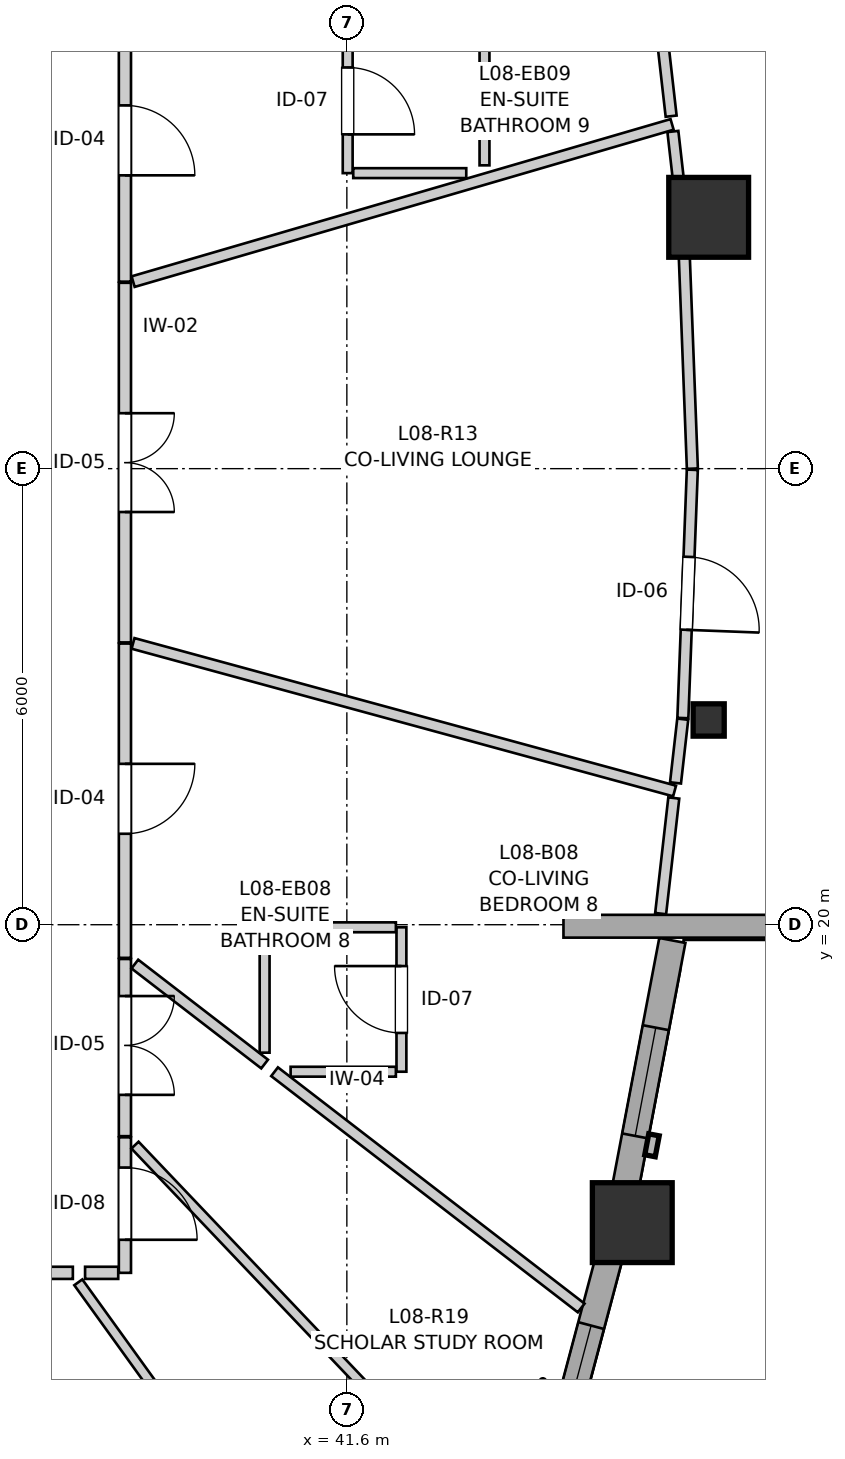
"""IFC4 building model, lengths in metres.
Left out: names, types, materials, properties, quantities, classifications, styles, units other than length and angle.
Written with IfcOpenShell. Run it as: python <this file> out.ifc"""

import sys

from ifc_helpers import new_model, si_unit, direction, frame, frame_2d, origin, origin_2d, place, context, subcontext, project, spatial, rectangle, i_section, extrude, source, transform, mapped, element, fill, save


model = new_model("IFC4")
c1 = context("Model", 3, precision=1e-05, world=origin(), true_north=direction((0.0, 1.0)))
c2 = subcontext(c1, "Body", "Model", "MODEL_VIEW")
j1 = project(units=[si_unit("LENGTHUNIT", "METRE"), si_unit("PLANEANGLEUNIT", "RADIAN")], contexts=[c1])
p1 = place(None, origin())
s1 = spatial("IfcSite", under=j1, at=p1, CompositionType="ELEMENT")
p2 = place(p1, origin())
s2 = spatial("IfcBuilding", under=s1, at=p2, CompositionType="ELEMENT")
p3 = place(p2, frame((0.0, 0.0, 30.2)))
s3 = spatial("IfcBuildingStorey", under=s2, at=p3, CompositionType="ELEMENT", Elevation=30.2)
m1 = source(origin(), c2, "Body", "SweptSolid", [
    extrude(rectangle(XDim=1.05, YDim=1.05, at=origin_2d()), origin(), (0.0, 0.0, 1.0), 2.935),
])
p4 = place(p3, frame((45.355, 16.081, 0.0), z_axis=(0.0, 0.0, 1.0), x_axis=(1.0, 0.0, 0.0)))
e1 = element("IfcColumn", 1, at=p4, inside=s3, PredefinedType="COLUMN", context=c2, shape_type="MappedRepresentation", body=[
    mapped(m1, transform((0.0, 0.0, 0.0), x_axis=(1.0, 0.0, 0.0), y_axis=(0.0, 1.0, 0.0), z_axis=(0.0, 0.0, 1.0), scale=1.0)),
])
m2 = source(origin(), c2, "Body", "SweptSolid", [
    extrude(i_section(OverallWidth=0.409, OverallDepth=0.425, WebThickness=0.03, FlangeThickness=0.048, FilletRadius=0.015, at=origin_2d()), origin(), (0.0, 0.0, 1.0), 2.935),
])
p5 = place(p3, frame((46.361, 22.694, 0.0), z_axis=(0.0, 0.0, 1.0), x_axis=(1.0, 0.0, 0.0)))
e2 = element("IfcColumn", 2, at=p5, inside=s3, PredefinedType="PILASTER", context=c2, shape_type="MappedRepresentation", body=[
    mapped(m2, transform((0.0, 0.0, 0.0), x_axis=(1.0, 0.0, 0.0), y_axis=(0.0, 1.0, 0.0), z_axis=(0.0, 0.0, 1.0), scale=1.0)),
])
p6 = place(p3, frame((46.361, 29.306, 0.0), z_axis=(0.0, 0.0, 1.0), x_axis=(1.0, 0.0, 0.0)))
e3 = element("IfcColumn", 3, at=p6, inside=s3, PredefinedType="COLUMN", context=c2, shape_type="MappedRepresentation", body=[
    mapped(m1, transform((0.0, 0.0, 0.0), x_axis=(1.0, 0.0, 0.0), y_axis=(0.0, 1.0, 0.0), z_axis=(0.0, 0.0, 1.0), scale=1.0)),
])
p7 = place(p3, frame((44.297, 12.782, 0.0), z_axis=(0.0, 0.0, 1.0), x_axis=(0.257090265476, 0.96638739406, 0.0)))
e4 = element("IfcWall", 4, at=p7, inside=s3, PredefinedType="SOLIDWALL", context=c2, shape_type="SweptSolid", body=[
    extrude(rectangle(XDim=3.159, YDim=0.35, at=frame_2d((1.58, 0.0))), origin(), (0.0, 0.0, 1.0), 2.415),
])
p8 = place(p7, frame((0.261, 0.0, 0.82)))
e5 = element("IfcOpeningElement", 5, at=p8, cuts=e4, PredefinedType="OPENING", context=c2, shape_type="SweptSolid", body=[
    extrude(rectangle(XDim=1.75, YDim=1.3, at=frame_2d((0.875, 0.65))), frame((0.0, 0.185, 0.0), z_axis=(0.0, -1.0, 0.0), x_axis=(1.0, 0.0, 0.0)), (0.0, 0.0, 1.0), 0.37),
])
p9 = place(p3, frame((45.24, 16.408, 0.0), z_axis=(0.0, 0.0, 1.0), x_axis=(0.186636709983, 0.982428999209, 0.0)))
e6 = element("IfcWall", 6, at=p9, inside=s3, PredefinedType="SOLIDWALL", context=c2, shape_type="SweptSolid", body=[
    extrude(rectangle(XDim=3.446, YDim=0.35, at=frame_2d((1.723, 0.0))), origin(), (0.0, 0.0, 1.0), 2.415),
])
p10 = place(p9, frame((0.828, 0.0, 0.82)))
e7 = element("IfcOpeningElement", 7, at=p10, cuts=e6, PredefinedType="OPENING", context=c2, shape_type="SweptSolid", body=[
    extrude(rectangle(XDim=1.45, YDim=1.25, at=frame_2d((0.725, 0.625))), frame((0.0, 0.185, 0.0), z_axis=(0.0, -1.0, 0.0), x_axis=(1.0, 0.0, 0.0)), (0.0, 0.0, 1.0), 0.37),
])
p11 = place(p3, frame((44.45, 19.98, 0.0), z_axis=(0.0, 0.0, 1.0), x_axis=(1.0, 0.0, 0.0)))
e8 = element("IfcWall", 8, at=p11, inside=s3, PredefinedType="SOLIDWALL", context=c2, shape_type="SweptSolid", body=[
    extrude(rectangle(XDim=20.685, YDim=0.3, at=frame_2d((10.342, 0.0))), origin(), (0.0, 0.0, 1.0), 2.115),
])
p12 = place(p3, frame((38.68, 28.445, 0.0), z_axis=(0.0, 0.0, 1.0), x_axis=(0.0, -1.0, 0.0)))
e9 = element("IfcWall", 9, at=p12, inside=s3, PredefinedType="PARTITIONING", context=c2, shape_type="SweptSolid", body=[
    extrude(rectangle(XDim=4.731, YDim=0.16, at=frame_2d((2.365, 0.0))), origin(), (0.0, 0.0, 1.0), 2.935),
])
p13 = place(p12, frame((1.716, 0.0, 0.0)))
e10 = element("IfcOpeningElement", 10, at=p13, cuts=e9, PredefinedType="OPENING", context=c2, shape_type="SweptSolid", body=[
    extrude(rectangle(XDim=1.3, YDim=2.1, at=frame_2d((0.65, 1.05))), frame((0.0, 0.09, 0.0), z_axis=(0.0, -1.0, 0.0), x_axis=(1.0, 0.0, 0.0)), (0.0, 0.0, 1.0), 0.18),
])
p14 = place(p3, frame((38.68, 23.699, 0.0), z_axis=(0.0, 0.0, 1.0), x_axis=(0.0, -1.0, 0.0)))
e11 = element("IfcWall", 11, at=p14, inside=s3, PredefinedType="PARTITIONING", context=c2, shape_type="SweptSolid", body=[
    extrude(rectangle(XDim=4.135, YDim=0.16, at=frame_2d((2.067, 0.0))), origin(), (0.0, 0.0, 1.0), 2.935),
])
p15 = place(p14, frame((1.583, 0.0, 0.0)))
e12 = element("IfcOpeningElement", 12, at=p15, cuts=e11, PredefinedType="OPENING", context=c2, shape_type="SweptSolid", body=[
    extrude(rectangle(XDim=0.92, YDim=2.1, at=frame_2d((0.46, 1.05))), frame((0.0, 0.09, 0.0), z_axis=(0.0, -1.0, 0.0), x_axis=(1.0, 0.0, 0.0)), (0.0, 0.0, 1.0), 0.18),
])
p16 = place(p3, frame((38.68, 32.175, 0.0), z_axis=(0.0, 0.0, 1.0), x_axis=(0.0, -1.0, 0.0)))
e13 = element("IfcWall", 13, at=p16, inside=s3, PredefinedType="PARTITIONING", context=c2, shape_type="SweptSolid", body=[
    extrude(rectangle(XDim=3.715, YDim=0.16, at=frame_2d((1.857, 0.0))), origin(), (0.0, 0.0, 1.0), 2.935),
])
p17 = place(p16, frame((1.396, 0.0, 0.0)))
e14 = element("IfcOpeningElement", 14, at=p17, cuts=e13, PredefinedType="OPENING", context=c2, shape_type="SweptSolid", body=[
    extrude(rectangle(XDim=0.92, YDim=2.1, at=frame_2d((0.46, 1.05))), frame((0.0, 0.09, 0.0), z_axis=(0.0, -1.0, 0.0), x_axis=(1.0, 0.0, 0.0)), (0.0, 0.0, 1.0), 0.18),
])
p18 = place(p3, frame((46.146, 25.985, 0.0), z_axis=(0.0, 0.0, 1.0), x_axis=(-0.038094618751, -0.999274136572, 0.0)))
e15 = element("IfcWall", 15, at=p18, inside=s3, PredefinedType="PARTITIONING", context=c2, shape_type="SweptSolid", body=[
    extrude(rectangle(XDim=3.269, YDim=0.145, at=frame_2d((1.634, 0.0))), origin(), (0.0, 0.0, 1.0), 2.403),
])
p19 = place(p18, frame((1.147, 0.0, 0.0)))
e16 = element("IfcOpeningElement", 16, at=p19, cuts=e15, PredefinedType="OPENING", context=c2, shape_type="SweptSolid", body=[
    extrude(rectangle(XDim=0.96, YDim=2.1, at=frame_2d((0.48, 1.05))), frame((0.0, 0.083, 0.0), z_axis=(0.0, -1.0, 0.0), x_axis=(1.0, 0.0, 0.0)), (0.0, 0.0, 1.0), 0.165),
])
p20 = place(p3, frame((37.995, 15.42, 0.0), z_axis=(0.0, 0.0, 1.0), x_axis=(-1.0, 0.0, 0.0)))
e17 = element("IfcWall", 17, at=p20, inside=s3, PredefinedType="PARTITIONING", context=c2, shape_type="SweptSolid", body=[
    extrude(rectangle(XDim=2.9, YDim=0.16, at=frame_2d((1.45, 0.0))), origin(), (0.0, 0.0, 1.0), 2.935),
])
p21 = place(p20, frame((1.014, 0.0, 0.0)))
e18 = element("IfcOpeningElement", 18, at=p21, cuts=e17, PredefinedType="OPENING", context=c2, shape_type="SweptSolid", body=[
    extrude(rectangle(XDim=0.92, YDim=2.1, at=frame_2d((0.46, 1.05))), frame((0.0, 0.09, 0.0), z_axis=(0.0, -1.0, 0.0), x_axis=(1.0, 0.0, 0.0)), (0.0, 0.0, 1.0), 0.18),
])
p22 = place(p3, frame((38.68, 19.549, 0.0), z_axis=(0.0, 0.0, 1.0), x_axis=(0.0, -1.0, 0.0)))
e19 = element("IfcWall", 19, at=p22, inside=s3, PredefinedType="PARTITIONING", context=c2, shape_type="SweptSolid", body=[
    extrude(rectangle(XDim=2.331, YDim=0.16, at=frame_2d((1.166, 0.0))), origin(), (0.0, 0.0, 1.0), 2.935),
])
p23 = place(p22, frame((0.488, 0.0, 0.0)))
e20 = element("IfcOpeningElement", 20, at=p23, cuts=e19, PredefinedType="OPENING", context=c2, shape_type="SweptSolid", body=[
    extrude(rectangle(XDim=1.3, YDim=2.1, at=frame_2d((0.65, 1.05))), frame((0.0, 0.09, 0.0), z_axis=(0.0, -1.0, 0.0), x_axis=(1.0, 0.0, 0.0)), (0.0, 0.0, 1.0), 0.18),
])
p24 = place(p3, frame((42.318, 18.066, 0.0), z_axis=(0.0, 0.0, 1.0), x_axis=(0.0, 1.0, 0.0)))
e21 = element("IfcWall", 21, at=p24, inside=s3, PredefinedType="PARTITIONING", context=c2, shape_type="SweptSolid", body=[
    extrude(rectangle(XDim=1.9, YDim=0.13, at=frame_2d((0.95, 0.0))), origin(), (0.0, 0.0, 1.0), 2.935),
])
p25 = place(p24, frame((0.51, 0.0, 0.0)))
e22 = element("IfcOpeningElement", 22, at=p25, cuts=e21, PredefinedType="OPENING", context=c2, shape_type="SweptSolid", body=[
    extrude(rectangle(XDim=0.88, YDim=2.05, at=frame_2d((0.44, 1.025))), frame((0.0, 0.075, 0.0), z_axis=(0.0, -1.0, 0.0), x_axis=(1.0, 0.0, 0.0)), (0.0, 0.0, 1.0), 0.15),
])
p26 = place(p3, frame((41.611, 31.788, 0.0), z_axis=(0.0, 0.0, 1.0), x_axis=(0.0, -1.0, 0.0)))
e23 = element("IfcWall", 23, at=p26, inside=s3, PredefinedType="PARTITIONING", context=c2, shape_type="SweptSolid", body=[
    extrude(rectangle(XDim=1.9, YDim=0.13, at=frame_2d((0.95, 0.0))), origin(), (0.0, 0.0, 1.0), 2.935),
])
p27 = place(p26, frame((0.51, 0.0, 0.0)))
e24 = element("IfcOpeningElement", 24, at=p27, cuts=e23, PredefinedType="OPENING", context=c2, shape_type="SweptSolid", body=[
    extrude(rectangle(XDim=0.88, YDim=2.05, at=frame_2d((0.44, 1.025))), frame((0.0, 0.075, 0.0), z_axis=(0.0, -1.0, 0.0), x_axis=(1.0, 0.0, 0.0)), (0.0, 0.0, 1.0), 0.15),
])
p28 = place(p3, frame((38.68, 17.203, 0.0), z_axis=(0.0, 0.0, 1.0), x_axis=(0.0, -1.0, 0.0)))
e25 = element("IfcWall", 25, at=p28, inside=s3, PredefinedType="PARTITIONING", context=c2, shape_type="SweptSolid", body=[
    extrude(rectangle(XDim=1.783, YDim=0.16, at=frame_2d((0.892, 0.0))), origin(), (0.0, 0.0, 1.0), 2.935),
])
p29 = place(p28, frame((0.398, 0.0, 0.0)))
e26 = element("IfcOpeningElement", 26, at=p29, cuts=e25, PredefinedType="OPENING", context=c2, shape_type="SweptSolid", body=[
    extrude(rectangle(XDim=0.95, YDim=2.1, at=frame_2d((0.475, 1.05))), frame((0.0, 0.09, 0.0), z_axis=(0.0, -1.0, 0.0), x_axis=(1.0, 0.0, 0.0)), (0.0, 0.0, 1.0), 0.18),
])
p30 = place(p3, frame((38.067, 15.295, 0.0), z_axis=(0.0, 0.0, 1.0), x_axis=(0.584777320582, -0.811193864211, 0.0)))
e27 = element("IfcWall", 27, at=p30, inside=s3, PredefinedType="PARTITIONING", context=c2, shape_type="SweptSolid", body=[
    extrude(rectangle(XDim=8.164, YDim=0.13, at=frame_2d((4.082, 0.0))), origin(), (0.0, 0.0, 1.0), 2.935),
])
p31 = place(p3, frame((38.788, 28.46, 0.0), z_axis=(0.0, 0.0, 1.0), x_axis=(0.959983709987, 0.280055845432, 0.0)))
e28 = element("IfcWall", 28, at=p31, inside=s3, PredefinedType="PARTITIONING", context=c2, shape_type="SweptSolid", body=[
    extrude(rectangle(XDim=7.386, YDim=0.145, at=frame_2d((3.693, 0.0))), origin(), (0.0, 0.0, 1.0), 2.935),
])
p32 = place(p3, frame((38.787, 23.701, 0.0), z_axis=(0.0, 0.0, 1.0), x_axis=(0.964810342249, -0.262946769308, 0.0)))
e29 = element("IfcWall", 29, at=p32, inside=s3, PredefinedType="PARTITIONING", context=c2, shape_type="SweptSolid", body=[
    extrude(rectangle(XDim=7.385, YDim=0.145, at=frame_2d((3.692, 0.0))), origin(), (0.0, 0.0, 1.0), 2.935),
])
p33 = place(p3, frame((38.812, 17.101, 0.0), z_axis=(0.0, 0.0, 1.0), x_axis=(0.689140556814, -0.724627692649, 0.0)))
e30 = element("IfcWall", 30, at=p33, inside=s3, PredefinedType="PARTITIONING", context=c2, shape_type="SweptSolid", body=[
    extrude(rectangle(XDim=7.217, YDim=0.13, at=frame_2d((3.608, 0.0))), origin(), (0.0, 0.0, 1.0), 2.935),
])
p34 = place(p3, frame((40.649, 18.066, 0.0), z_axis=(0.0, 0.0, 1.0), x_axis=(0.792155051101, -0.610319895641, 0.0)))
e31 = element("IfcWall", 31, at=p34, inside=s3, PredefinedType="PARTITIONING", context=c2, shape_type="SweptSolid", body=[
    extrude(rectangle(XDim=5.093, YDim=0.145, at=frame_2d((2.546, 0.0))), origin(), (0.0, 0.0, 1.0), 2.935),
])
p35 = place(p3, frame((46.021, 29.281, 0.0), z_axis=(0.0, 0.0, 1.0), x_axis=(0.038070453861, -0.999275057501, 0.0)))
e32 = element("IfcWall", 32, at=p35, inside=s3, PredefinedType="PARTITIONING", context=c2, shape_type="SweptSolid", body=[
    extrude(rectangle(XDim=3.283, YDim=0.145, at=frame_2d((1.642, 0.0))), origin(), (0.0, 0.0, 1.0), 2.403),
])
p36 = place(p3, frame((38.811, 19.482, 0.0), z_axis=(0.0, 0.0, 1.0), x_axis=(0.792185877025, -0.61027988353, 0.0)))
e33 = element("IfcWall", 33, at=p36, inside=s3, PredefinedType="PARTITIONING", context=c2, shape_type="SweptSolid", body=[
    extrude(rectangle(XDim=2.156, YDim=0.145, at=frame_2d((1.078, 0.0))), origin(), (0.0, 0.0, 1.0), 2.935),
])
p37 = place(p3, frame((43.411, 29.99, 0.0), z_axis=(0.0, 0.0, 1.0), x_axis=(0.0, 1.0, 0.0)))
e34 = element("IfcWall", 34, at=p37, inside=s3, PredefinedType="PARTITIONING", context=c2, shape_type="SweptSolid", body=[
    extrude(rectangle(XDim=1.798, YDim=0.13, at=frame_2d((0.899, 0.0))), origin(), (0.0, 0.0, 1.0), 2.935),
])
p38 = place(p3, frame((41.684, 29.888, 0.0), z_axis=(0.0, 0.0, 1.0), x_axis=(1.0, 0.0, 0.0)))
e35 = element("IfcWall", 35, at=p38, inside=s3, PredefinedType="PARTITIONING", context=c2, shape_type="SweptSolid", body=[
    extrude(rectangle(XDim=1.487, YDim=0.13, at=frame_2d((0.743, 0.0))), origin(), (0.0, 0.0, 1.0), 2.935),
])
p39 = place(p3, frame((40.518, 19.966, 0.0), z_axis=(0.0, 0.0, 1.0), x_axis=(1.0, 0.0, 0.0)))
e36 = element("IfcWall", 36, at=p39, inside=s3, PredefinedType="PARTITIONING", context=c2, shape_type="SweptSolid", body=[
    extrude(rectangle(XDim=1.727, YDim=0.13, at=frame_2d((0.864, 0.0))), origin(), (0.0, 0.0, 1.0), 2.103),
])
p40 = place(p3, frame((40.518, 18.317, 0.0), z_axis=(0.0, 0.0, 1.0), x_axis=(0.0, 1.0, 0.0)))
e37 = element("IfcWall", 37, at=p40, inside=s3, PredefinedType="PARTITIONING", context=c2, shape_type="SweptSolid", body=[
    extrude(rectangle(XDim=1.576, YDim=0.13, at=frame_2d((0.788, 0.0))), origin(), (0.0, 0.0, 1.0), 2.935),
])
p41 = place(p3, frame((40.86, 18.066, 0.0), z_axis=(0.0, 0.0, 1.0), x_axis=(1.0, 0.0, 0.0)))
e38 = element("IfcWall", 38, at=p41, inside=s3, PredefinedType="PARTITIONING", context=c2, shape_type="SweptSolid", body=[
    extrude(rectangle(XDim=1.385, YDim=0.13, at=frame_2d((0.692, 0.0))), origin(), (0.0, 0.0, 1.0), 2.935),
])
p42 = place(p3, frame((45.729, 20.146, 0.0), z_axis=(0.0, 0.0, 1.0), x_axis=(0.113074294354, 0.993586535716, 0.0)))
e39 = element("IfcWall", 39, at=p42, inside=s3, PredefinedType="PARTITIONING", context=c2, shape_type="SweptSolid", body=[
    extrude(rectangle(XDim=1.531, YDim=0.145, at=frame_2d((0.765, 0.0))), origin(), (0.0, 0.0, 1.0), 2.403),
])
p43 = place(p3, frame((45.89, 30.436, 0.0), z_axis=(0.0, 0.0, 1.0), x_axis=(0.113024308153, -0.993592223081, 0.0)))
e40 = element("IfcWall", 40, at=p43, inside=s3, PredefinedType="PARTITIONING", context=c2, shape_type="SweptSolid", body=[
    extrude(rectangle(XDim=1.147, YDim=0.145, at=frame_2d((0.573, 0.0))), origin(), (0.0, 0.0, 1.0), 2.403),
])
p44 = place(p3, frame((45.729, 31.854, 0.0), z_axis=(0.0, 0.0, 1.0), x_axis=(0.112860473391, -0.993610846129, 0.0)))
e41 = element("IfcWall", 41, at=p44, inside=s3, PredefinedType="PARTITIONING", context=c2, shape_type="SweptSolid", body=[
    extrude(rectangle(XDim=1.224, YDim=0.145, at=frame_2d((0.612, 0.0))), origin(), (0.0, 0.0, 1.0), 2.403),
])
p45 = place(p3, frame((45.924, 21.866, 0.0), z_axis=(0.0, 0.0, 1.0), x_axis=(0.112844765803, 0.993612630169, 0.0)))
e42 = element("IfcWall", 42, at=p45, inside=s3, PredefinedType="PARTITIONING", context=c2, shape_type="SweptSolid", body=[
    extrude(rectangle(XDim=0.844, YDim=0.145, at=frame_2d((0.422, 0.0))), origin(), (0.0, 0.0, 1.0), 2.403),
])
p46 = place(p3, frame((38.156, 15.42, 0.0), z_axis=(0.0, 0.0, 1.0), x_axis=(1.0, 0.0, 0.0)))
e43 = element("IfcWall", 43, at=p46, inside=s3, PredefinedType="PARTITIONING", context=c2, shape_type="SweptSolid", body=[
    extrude(rectangle(XDim=0.436, YDim=0.16, at=frame_2d((0.218, 0.0))), origin(), (0.0, 0.0, 1.0), 2.935),
])
m3 = source(origin(), c2, "Body", "SweptSolid", [
    extrude(rectangle(XDim=1.75, YDim=1.3, at=frame_2d((0.875, 0.65))), frame((0.0, 0.03, 0.0), z_axis=(0.0, -1.0, 0.0), x_axis=(1.0, 0.0, 0.0)), (0.0, 0.0, 1.0), 0.06),
])
p47 = place(p8, origin())
e44 = element("IfcWindow", 44, at=p47, inside=s3, PartitioningType="SINGLE_PANEL", PredefinedType="WINDOW", context=c2, shape_type="MappedRepresentation", body=[
    mapped(m3, transform((0.0, 0.0, 0.0), x_axis=(1.0, 0.0, 0.0), y_axis=(0.0, 1.0, 0.0), z_axis=(0.0, 0.0, 1.0), scale=1.0)),
])
fill(e5, e44)
m4 = source(origin(), c2, "Body", "SweptSolid", [
    extrude(rectangle(XDim=1.45, YDim=1.25, at=frame_2d((0.725, 0.625))), frame((0.0, 0.03, 0.0), z_axis=(0.0, -1.0, 0.0), x_axis=(1.0, 0.0, 0.0)), (0.0, 0.0, 1.0), 0.06),
])
p48 = place(p10, origin())
e45 = element("IfcWindow", 45, at=p48, inside=s3, PartitioningType="SINGLE_PANEL", PredefinedType="WINDOW", context=c2, shape_type="MappedRepresentation", body=[
    mapped(m4, transform((0.0, 0.0, 0.0), x_axis=(1.0, 0.0, 0.0), y_axis=(0.0, 1.0, 0.0), z_axis=(0.0, 0.0, 1.0), scale=1.0)),
])
fill(e7, e45)
m5 = source(origin(), c2, "Body", "SweptSolid", [
    extrude(rectangle(XDim=1.3, YDim=2.1, at=frame_2d((0.65, 1.05))), frame((0.0, 0.025, 0.0), z_axis=(0.0, -1.0, 0.0), x_axis=(1.0, 0.0, 0.0)), (0.0, 0.0, 1.0), 0.05),
])
p49 = place(p13, origin())
e46 = element("IfcDoor", 46, at=p49, inside=s3, OperationType="DOUBLE_DOOR_SINGLE_SWING", PredefinedType="DOOR", context=c2, shape_type="MappedRepresentation", body=[
    mapped(m5, transform((0.0, 0.0, 0.0), x_axis=(1.0, 0.0, 0.0), y_axis=(0.0, 1.0, 0.0), z_axis=(0.0, 0.0, 1.0), scale=1.0)),
])
fill(e10, e46)
m6 = source(origin(), c2, "Body", "SweptSolid", [
    extrude(rectangle(XDim=0.92, YDim=2.1, at=frame_2d((0.46, 1.05))), frame((0.0, 0.025, 0.0), z_axis=(0.0, -1.0, 0.0), x_axis=(1.0, 0.0, 0.0)), (0.0, 0.0, 1.0), 0.05),
])
p50 = place(p15, origin())
e47 = element("IfcDoor", 47, at=p50, inside=s3, OperationType="SINGLE_SWING_LEFT", PredefinedType="DOOR", context=c2, shape_type="MappedRepresentation", body=[
    mapped(m6, transform((0.0, 0.0, 0.0), x_axis=(1.0, 0.0, 0.0), y_axis=(0.0, 1.0, 0.0), z_axis=(0.0, 0.0, 1.0), scale=1.0)),
])
fill(e12, e47)
p51 = place(p17, origin())
e48 = element("IfcDoor", 48, at=p51, inside=s3, OperationType="SINGLE_SWING_RIGHT", PredefinedType="DOOR", context=c2, shape_type="MappedRepresentation", body=[
    mapped(m6, transform((0.0, 0.0, 0.0), x_axis=(1.0, 0.0, 0.0), y_axis=(0.0, 1.0, 0.0), z_axis=(0.0, 0.0, 1.0), scale=1.0)),
])
fill(e14, e48)
m7 = source(origin(), c2, "Body", "SweptSolid", [
    extrude(rectangle(XDim=0.96, YDim=2.1, at=frame_2d((0.48, 1.05))), frame((0.0, 0.025, 0.0), z_axis=(0.0, -1.0, 0.0), x_axis=(1.0, 0.0, 0.0)), (0.0, 0.0, 1.0), 0.05),
])
p52 = place(p19, origin())
e49 = element("IfcDoor", 49, at=p52, inside=s3, OperationType="SINGLE_SWING_RIGHT", PredefinedType="DOOR", context=c2, shape_type="MappedRepresentation", body=[
    mapped(m7, transform((0.0, 0.0, 0.0), x_axis=(1.0, 0.0, 0.0), y_axis=(0.0, 1.0, 0.0), z_axis=(0.0, 0.0, 1.0), scale=1.0)),
])
fill(e16, e49)
p53 = place(p23, origin())
e50 = element("IfcDoor", 50, at=p53, inside=s3, OperationType="DOUBLE_DOOR_SINGLE_SWING", PredefinedType="DOOR", context=c2, shape_type="MappedRepresentation", body=[
    mapped(m5, transform((0.0, 0.0, 0.0), x_axis=(1.0, 0.0, 0.0), y_axis=(0.0, 1.0, 0.0), z_axis=(0.0, 0.0, 1.0), scale=1.0)),
])
fill(e20, e50)
m8 = source(origin(), c2, "Body", "SweptSolid", [
    extrude(rectangle(XDim=0.88, YDim=2.05, at=frame_2d((0.44, 1.025))), frame((0.0, 0.025, 0.0), z_axis=(0.0, -1.0, 0.0), x_axis=(1.0, 0.0, 0.0)), (0.0, 0.0, 1.0), 0.05),
])
p54 = place(p25, origin())
e51 = element("IfcDoor", 51, at=p54, inside=s3, OperationType="SINGLE_SWING_RIGHT", PredefinedType="DOOR", context=c2, shape_type="MappedRepresentation", body=[
    mapped(m8, transform((0.0, 0.0, 0.0), x_axis=(1.0, 0.0, 0.0), y_axis=(0.0, 1.0, 0.0), z_axis=(0.0, 0.0, 1.0), scale=1.0)),
])
fill(e22, e51)
p55 = place(p27, origin())
e52 = element("IfcDoor", 52, at=p55, inside=s3, OperationType="SINGLE_SWING_RIGHT", PredefinedType="DOOR", context=c2, shape_type="MappedRepresentation", body=[
    mapped(m8, transform((0.0, 0.0, 0.0), x_axis=(1.0, 0.0, 0.0), y_axis=(0.0, 1.0, 0.0), z_axis=(0.0, 0.0, 1.0), scale=1.0)),
])
fill(e24, e52)
m9 = source(origin(), c2, "Body", "SweptSolid", [
    extrude(rectangle(XDim=0.95, YDim=2.1, at=frame_2d((0.475, 1.05))), frame((0.0, 0.025, 0.0), z_axis=(0.0, -1.0, 0.0), x_axis=(1.0, 0.0, 0.0)), (0.0, 0.0, 1.0), 0.05),
])
p56 = place(p29, origin())
e53 = element("IfcDoor", 53, at=p56, inside=s3, OperationType="SINGLE_SWING_RIGHT", PredefinedType="DOOR", context=c2, shape_type="MappedRepresentation", body=[
    mapped(m9, transform((0.0, 0.0, 0.0), x_axis=(1.0, 0.0, 0.0), y_axis=(0.0, 1.0, 0.0), z_axis=(0.0, 0.0, 1.0), scale=1.0)),
])
fill(e26, e53)
save(model, sys.argv[1])
